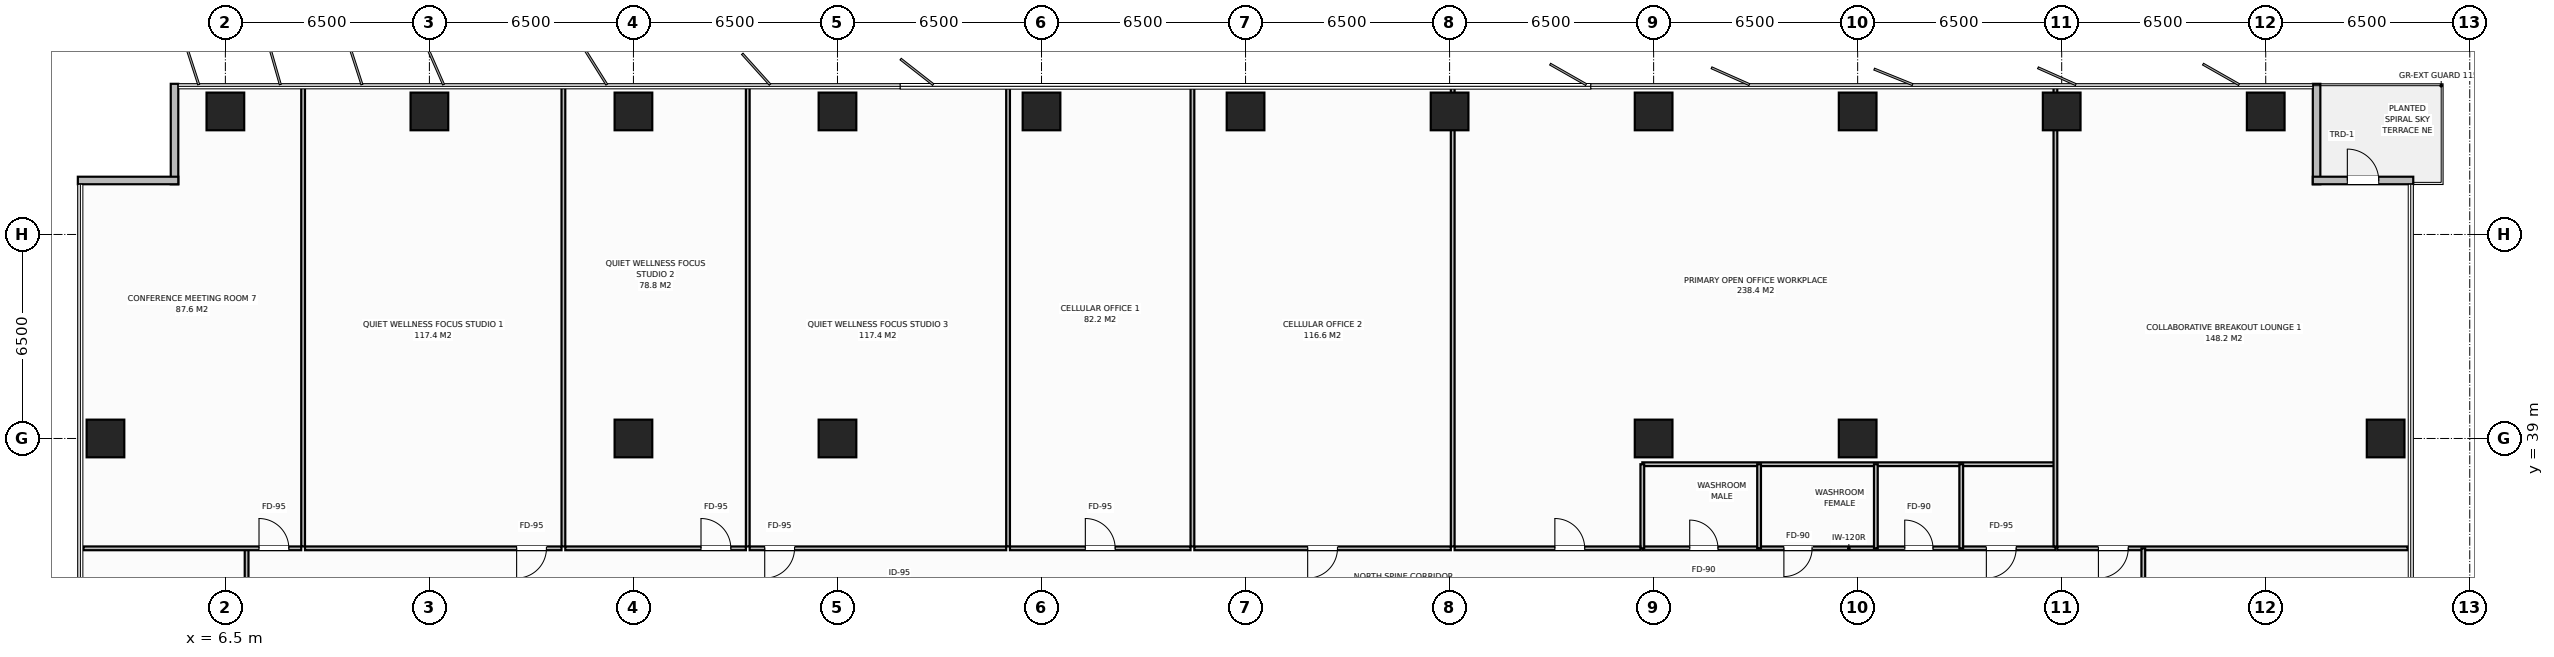
"""IFC4 building model, lengths in metres.
Left out: names, types, materials, properties, quantities, classifications, styles, units other than length and angle.
Written with IfcOpenShell. Run it as: python <this file> out.ifc"""

import sys

from ifc_helpers import new_model, si_unit, direction, frame, frame_2d, origin, origin_2d, place, context, subcontext, project, spatial, rectangle, extrude, element, fill, save


model = new_model("IFC4")
c1 = context("Model", 3, precision=1e-05, world=origin(), true_north=direction((0.0, 1.0)))
c2 = subcontext(c1, "Body", "Model", "MODEL_VIEW")
j1 = project(units=[si_unit("LENGTHUNIT", "METRE"), si_unit("PLANEANGLEUNIT", "RADIAN")], contexts=[c1])
p1 = place(None, origin())
s1 = spatial("IfcSite", under=j1, at=p1, CompositionType="ELEMENT")
p2 = place(p1, origin())
s2 = spatial("IfcBuilding", under=s1, at=p2, CompositionType="ELEMENT")
p3 = place(p2, frame((0.0, 0.0, 135.4)))
s3 = spatial("IfcBuildingStorey", under=s2, at=p3, CompositionType="ELEMENT", Elevation=135.4)
for number, where, z_axis, x_axis in (
    (1, (19.5, 39.0, 0.0), (0.0, 0.0, 1.0), (1.0, 0.0, 0.0)),
    (2, (58.5, 39.0, 0.0), (0.0, 0.0, 1.0), (1.0, 0.0, 0.0)),
    (3, (26.0, 39.0, 0.0), (0.0, 0.0, 1.0), (1.0, 0.0, 0.0)),
    (4, (52.0, 39.0, 0.0), (0.0, 0.0, 1.0), (1.0, 0.0, 0.0)),
    (5, (6.5, 49.42, 0.0), (0.0, 0.0, 1.0), (1.0, 0.0, 0.0)),
    (6, (13.0, 49.42, 0.0), (0.0, 0.0, 1.0), (1.0, 0.0, 0.0)),
    (7, (19.5, 49.42, 0.0), (0.0, 0.0, 1.0), (1.0, 0.0, 0.0)),
    (8, (26.0, 49.42, 0.0), (0.0, 0.0, 1.0), (1.0, 0.0, 0.0)),
    (9, (32.5, 49.42, 0.0), (0.0, 0.0, 1.0), (1.0, 0.0, 0.0)),
    (10, (39.0, 49.42, 0.0), (0.0, 0.0, 1.0), (1.0, 0.0, 0.0)),
    (11, (45.5, 49.42, 0.0), (0.0, 0.0, 1.0), (1.0, 0.0, 0.0)),
    (12, (52.0, 49.42, 0.0), (0.0, 0.0, 1.0), (1.0, 0.0, 0.0)),
    (13, (58.5, 49.42, 0.0), (0.0, 0.0, 1.0), (1.0, 0.0, 0.0)),
    (14, (65.0, 49.42, 0.0), (0.0, 0.0, 1.0), (1.0, 0.0, 0.0)),
    (15, (71.5, 49.42, 0.0), (0.0, 0.0, 1.0), (1.0, 0.0, 0.0)),
    (16, (2.68, 39.0, 0.0), (0.0, 0.0, 1.0), (1.0, 0.0, 0.0)),
    (17, (75.32, 39.0, 0.0), (0.0, 0.0, 1.0), (1.0, 0.0, 0.0)),
):
    element("IfcColumn", number, at=place(p3, frame(where, z_axis=z_axis, x_axis=x_axis)), inside=s3, PredefinedType="COLUMN", context=c2, shape_type="SweptSolid", body=[
        extrude(rectangle(XDim=1.2, YDim=1.2, at=origin_2d()), origin(), (0.0, 0.0, 1.0), 3.8),
    ])
for number, where, z_axis, x_axis in (
    (18, (4.88, 47.1, 0.0), (0.0, 0.0, 1.0), (0.0, 1.0, 0.0)),
    (19, (1.8, 47.22, 0.0), (0.0, 0.0, 1.0), (1.0, 0.0, 0.0)),
    (20, (73.12, 50.3, 0.0), (0.0, 0.0, 1.0), (0.0, -1.0, 0.0)),
):
    element("IfcWall", number, at=place(p3, frame(where, z_axis=z_axis, x_axis=x_axis)), inside=s3, PredefinedType="STANDARD", context=c2, shape_type="SweptSolid", body=[
        extrude(rectangle(XDim=3.2, YDim=0.24, at=frame_2d((1.6, 0.0))), origin(), (0.0, 0.0, 1.0), 3.52),
    ])
p4 = place(p3, frame((73.0, 47.22, 0.0), z_axis=(0.0, 0.0, 1.0), x_axis=(1.0, 0.0, 0.0)))
e21 = element("IfcWall", 21, at=p4, inside=s3, PredefinedType="STANDARD", context=c2, shape_type="SweptSolid", body=[
    extrude(rectangle(XDim=3.2, YDim=0.24, at=frame_2d((1.6, 0.0))), origin(), (0.0, 0.0, 1.0), 3.52),
])
p5 = place(p4, frame((1.1, 0.0, 0.0)))
e22 = element("IfcOpeningElement", 22, at=p5, cuts=e21, PredefinedType="OPENING", context=c2, shape_type="SweptSolid", body=[
    extrude(rectangle(XDim=1.0, YDim=2.2, at=frame_2d((0.5, 1.1))), frame((0.0, 0.13, 0.0), z_axis=(0.0, -1.0, 0.0), x_axis=(1.0, 0.0, 0.0)), (0.0, 0.0, 1.0), 0.26),
])
p6 = place(p3, frame((7.177, 33.4, 0.0), z_axis=(0.0, 0.0, 1.0), x_axis=(0.0, 1.0, 0.0)))
e23 = element("IfcWall", 23, at=p6, inside=s3, PredefinedType="PARTITIONING", context=c2, shape_type="SweptSolid", body=[
    extrude(rectangle(XDim=2.1, YDim=0.12, at=frame_2d((1.05, 0.0))), origin(), (0.0, 0.0, 1.0), 3.52),
])
p7 = place(p3, frame((51.64, 35.5, 0.0), z_axis=(0.0, 0.0, 1.0), x_axis=(1.0, 0.0, 0.0)))
e24 = element("IfcWall", 24, at=p7, inside=s3, PredefinedType="PARTITIONING", context=c2, shape_type="SweptSolid", body=[
    extrude(rectangle(XDim=13.16, YDim=0.12, at=frame_2d((6.58, 0.0))), origin(), (0.0, 0.0, 1.0), 3.52),
])
p8 = place(p7, frame((1.51, 0.0, 0.0)))
e25 = element("IfcOpeningElement", 25, at=p8, cuts=e24, PredefinedType="OPENING", context=c2, shape_type="SweptSolid", body=[
    extrude(rectangle(XDim=0.9, YDim=2.15, at=frame_2d((0.45, 1.075))), frame((0.0, 0.07, 0.0), z_axis=(0.0, -1.0, 0.0), x_axis=(1.0, 0.0, 0.0)), (0.0, 0.0, 1.0), 0.14),
])
p9 = place(p7, frame((4.51, 0.0, 0.0)))
e26 = element("IfcOpeningElement", 26, at=p9, cuts=e24, PredefinedType="OPENING", context=c2, shape_type="SweptSolid", body=[
    extrude(rectangle(XDim=0.9, YDim=2.15, at=frame_2d((0.45, 1.075))), frame((0.0, 0.07, 0.0), z_axis=(0.0, -1.0, 0.0), x_axis=(1.0, 0.0, 0.0)), (0.0, 0.0, 1.0), 0.14),
])
p10 = place(p7, frame((8.36, 0.0, 0.0)))
e27 = element("IfcOpeningElement", 27, at=p10, cuts=e24, PredefinedType="OPENING", context=c2, shape_type="SweptSolid", body=[
    extrude(rectangle(XDim=0.9, YDim=2.15, at=frame_2d((0.45, 1.075))), frame((0.0, 0.07, 0.0), z_axis=(0.0, -1.0, 0.0), x_axis=(1.0, 0.0, 0.0)), (0.0, 0.0, 1.0), 0.14),
])
p11 = place(p7, frame((10.96, 0.0, 0.0)))
e28 = element("IfcOpeningElement", 28, at=p11, cuts=e24, PredefinedType="OPENING", context=c2, shape_type="SweptSolid", body=[
    extrude(rectangle(XDim=0.95, YDim=2.15, at=frame_2d((0.475, 1.075))), frame((0.0, 0.07, 0.0), z_axis=(0.0, -1.0, 0.0), x_axis=(1.0, 0.0, 0.0)), (0.0, 0.0, 1.0), 0.14),
])
p12 = place(p3, frame((51.64, 38.18, 0.0), z_axis=(0.0, 0.0, 1.0), x_axis=(1.0, 0.0, 0.0)))
e29 = element("IfcWall", 29, at=p12, inside=s3, PredefinedType="PARTITIONING", context=c2, shape_type="SweptSolid", body=[
    extrude(rectangle(XDim=13.16, YDim=0.12, at=frame_2d((6.58, 0.0))), origin(), (0.0, 0.0, 1.0), 3.52),
])
for number, where, z_axis, x_axis in (
    (30, (51.64, 35.5, 0.0), (0.0, 0.0, 1.0), (0.0, 1.0, 0.0)),
    (31, (55.36, 35.5, 0.0), (0.0, 0.0, 1.0), (0.0, 1.0, 0.0)),
    (32, (59.08, 35.5, 0.0), (0.0, 0.0, 1.0), (0.0, 1.0, 0.0)),
    (33, (61.8, 35.5, 0.0), (0.0, 0.0, 1.0), (0.0, 1.0, 0.0)),
):
    element("IfcWall", number, at=place(p3, frame(where, z_axis=z_axis, x_axis=x_axis)), inside=s3, PredefinedType="PARTITIONING", context=c2, shape_type="SweptSolid", body=[
        extrude(rectangle(XDim=2.68, YDim=0.12, at=frame_2d((1.34, 0.0))), origin(), (0.0, 0.0, 1.0), 3.52),
    ])
p13 = place(p3, frame((8.977, 35.56, 0.0), z_axis=(0.0, 0.0, 1.0), x_axis=(0.0, 1.0, 0.0)))
e34 = element("IfcWall", 34, at=p13, inside=s3, PredefinedType="PARTITIONING", context=c2, shape_type="SweptSolid", body=[
    extrude(rectangle(XDim=14.72, YDim=0.12, at=frame_2d((7.36, 0.0))), origin(), (0.0, 0.0, 1.0), 3.52),
])
p14 = place(p3, frame((1.98, 35.5, 0.0), z_axis=(0.0, 0.0, 1.0), x_axis=(1.0, 0.0, 0.0)))
e35 = element("IfcWall", 35, at=p14, inside=s3, PredefinedType="PARTITIONING", context=c2, shape_type="SweptSolid", body=[
    extrude(rectangle(XDim=6.937, YDim=0.12, at=frame_2d((3.468, 0.0))), origin(), (0.0, 0.0, 1.0), 3.52),
])
p15 = place(p14, frame((5.592, 0.0, 0.0)))
e36 = element("IfcOpeningElement", 36, at=p15, cuts=e35, PredefinedType="OPENING", context=c2, shape_type="SweptSolid", body=[
    extrude(rectangle(XDim=0.95, YDim=2.15, at=frame_2d((0.475, 1.075))), frame((0.0, 0.07, 0.0), z_axis=(0.0, -1.0, 0.0), x_axis=(1.0, 0.0, 0.0)), (0.0, 0.0, 1.0), 0.14),
])
p16 = place(p3, frame((17.269, 35.56, 0.0), z_axis=(0.0, 0.0, 1.0), x_axis=(0.0, 1.0, 0.0)))
e37 = element("IfcWall", 37, at=p16, inside=s3, PredefinedType="PARTITIONING", context=c2, shape_type="SweptSolid", body=[
    extrude(rectangle(XDim=14.72, YDim=0.12, at=frame_2d((7.36, 0.0))), origin(), (0.0, 0.0, 1.0), 3.52),
])
p17 = place(p3, frame((9.037, 35.5, 0.0), z_axis=(0.0, 0.0, 1.0), x_axis=(1.0, 0.0, 0.0)))
e38 = element("IfcWall", 38, at=p17, inside=s3, PredefinedType="PARTITIONING", context=c2, shape_type="SweptSolid", body=[
    extrude(rectangle(XDim=8.172, YDim=0.12, at=frame_2d((4.086, 0.0))), origin(), (0.0, 0.0, 1.0), 3.52),
])
p18 = place(p17, frame((6.742, 0.0, 0.0)))
e39 = element("IfcOpeningElement", 39, at=p18, cuts=e38, PredefinedType="OPENING", context=c2, shape_type="SweptSolid", body=[
    extrude(rectangle(XDim=0.95, YDim=2.15, at=frame_2d((0.475, 1.075))), frame((0.0, 0.07, 0.0), z_axis=(0.0, -1.0, 0.0), x_axis=(1.0, 0.0, 0.0)), (0.0, 0.0, 1.0), 0.14),
])
p19 = place(p3, frame((23.142, 35.56, 0.0), z_axis=(0.0, 0.0, 1.0), x_axis=(0.0, 1.0, 0.0)))
e40 = element("IfcWall", 40, at=p19, inside=s3, PredefinedType="PARTITIONING", context=c2, shape_type="SweptSolid", body=[
    extrude(rectangle(XDim=14.72, YDim=0.12, at=frame_2d((7.36, 0.0))), origin(), (0.0, 0.0, 1.0), 3.52),
])
p20 = place(p3, frame((17.329, 35.5, 0.0), z_axis=(0.0, 0.0, 1.0), x_axis=(1.0, 0.0, 0.0)))
e41 = element("IfcWall", 41, at=p20, inside=s3, PredefinedType="PARTITIONING", context=c2, shape_type="SweptSolid", body=[
    extrude(rectangle(XDim=5.754, YDim=0.12, at=frame_2d((2.877, 0.0))), origin(), (0.0, 0.0, 1.0), 3.52),
])
p21 = place(p20, frame((4.323, 0.0, 0.0)))
e42 = element("IfcOpeningElement", 42, at=p21, cuts=e41, PredefinedType="OPENING", context=c2, shape_type="SweptSolid", body=[
    extrude(rectangle(XDim=0.95, YDim=2.15, at=frame_2d((0.475, 1.075))), frame((0.0, 0.07, 0.0), z_axis=(0.0, -1.0, 0.0), x_axis=(1.0, 0.0, 0.0)), (0.0, 0.0, 1.0), 0.14),
])
p22 = place(p3, frame((31.434, 35.56, 0.0), z_axis=(0.0, 0.0, 1.0), x_axis=(0.0, 1.0, 0.0)))
e43 = element("IfcWall", 43, at=p22, inside=s3, PredefinedType="PARTITIONING", context=c2, shape_type="SweptSolid", body=[
    extrude(rectangle(XDim=14.72, YDim=0.12, at=frame_2d((7.36, 0.0))), origin(), (0.0, 0.0, 1.0), 3.52),
])
p23 = place(p3, frame((23.202, 35.5, 0.0), z_axis=(0.0, 0.0, 1.0), x_axis=(1.0, 0.0, 0.0)))
e44 = element("IfcWall", 44, at=p23, inside=s3, PredefinedType="PARTITIONING", context=c2, shape_type="SweptSolid", body=[
    extrude(rectangle(XDim=8.172, YDim=0.12, at=frame_2d((4.086, 0.0))), origin(), (0.0, 0.0, 1.0), 3.52),
])
p24 = place(p23, frame((0.48, 0.0, 0.0)))
e45 = element("IfcOpeningElement", 45, at=p24, cuts=e44, PredefinedType="OPENING", context=c2, shape_type="SweptSolid", body=[
    extrude(rectangle(XDim=0.95, YDim=2.15, at=frame_2d((0.475, 1.075))), frame((0.0, 0.07, 0.0), z_axis=(0.0, -1.0, 0.0), x_axis=(1.0, 0.0, 0.0)), (0.0, 0.0, 1.0), 0.14),
])
p25 = place(p3, frame((37.308, 35.56, 0.0), z_axis=(0.0, 0.0, 1.0), x_axis=(0.0, 1.0, 0.0)))
e46 = element("IfcWall", 46, at=p25, inside=s3, PredefinedType="PARTITIONING", context=c2, shape_type="SweptSolid", body=[
    extrude(rectangle(XDim=14.72, YDim=0.12, at=frame_2d((7.36, 0.0))), origin(), (0.0, 0.0, 1.0), 3.52),
])
p26 = place(p3, frame((31.494, 35.5, 0.0), z_axis=(0.0, 0.0, 1.0), x_axis=(1.0, 0.0, 0.0)))
e47 = element("IfcWall", 47, at=p26, inside=s3, PredefinedType="PARTITIONING", context=c2, shape_type="SweptSolid", body=[
    extrude(rectangle(XDim=5.753, YDim=0.12, at=frame_2d((2.877, 0.0))), origin(), (0.0, 0.0, 1.0), 3.52),
])
p27 = place(p26, frame((2.402, 0.0, 0.0)))
e48 = element("IfcOpeningElement", 48, at=p27, cuts=e47, PredefinedType="OPENING", context=c2, shape_type="SweptSolid", body=[
    extrude(rectangle(XDim=0.95, YDim=2.15, at=frame_2d((0.475, 1.075))), frame((0.0, 0.07, 0.0), z_axis=(0.0, -1.0, 0.0), x_axis=(1.0, 0.0, 0.0)), (0.0, 0.0, 1.0), 0.14),
])
p28 = place(p3, frame((45.6, 35.56, 0.0), z_axis=(0.0, 0.0, 1.0), x_axis=(0.0, 1.0, 0.0)))
e49 = element("IfcWall", 49, at=p28, inside=s3, PredefinedType="PARTITIONING", context=c2, shape_type="SweptSolid", body=[
    extrude(rectangle(XDim=14.72, YDim=0.12, at=frame_2d((7.36, 0.0))), origin(), (0.0, 0.0, 1.0), 2.72),
])
p29 = place(p3, frame((37.368, 35.5, 0.0), z_axis=(0.0, 0.0, 1.0), x_axis=(1.0, 0.0, 0.0)))
e50 = element("IfcWall", 50, at=p29, inside=s3, PredefinedType="PARTITIONING", context=c2, shape_type="SweptSolid", body=[
    extrude(rectangle(XDim=8.172, YDim=0.12, at=frame_2d((4.086, 0.0))), origin(), (0.0, 0.0, 1.0), 3.52),
])
p30 = place(p29, frame((3.611, 0.0, 0.0)))
e51 = element("IfcOpeningElement", 51, at=p30, cuts=e50, PredefinedType="OPENING", context=c2, shape_type="SweptSolid", body=[
    extrude(rectangle(XDim=0.95, YDim=2.15, at=frame_2d((0.475, 1.075))), frame((0.0, 0.07, 0.0), z_axis=(0.0, -1.0, 0.0), x_axis=(1.0, 0.0, 0.0)), (0.0, 0.0, 1.0), 0.14),
])
p31 = place(p3, frame((64.8, 35.56, 0.0), z_axis=(0.0, 0.0, 1.0), x_axis=(0.0, 1.0, 0.0)))
e52 = element("IfcWall", 52, at=p31, inside=s3, PredefinedType="PARTITIONING", context=c2, shape_type="SweptSolid", body=[
    extrude(rectangle(XDim=14.72, YDim=0.12, at=frame_2d((7.36, 0.0))), origin(), (0.0, 0.0, 1.0), 2.72),
])
p32 = place(p3, frame((45.66, 35.5, 0.0), z_axis=(0.0, 0.0, 1.0), x_axis=(1.0, 0.0, 0.0)))
e53 = element("IfcWall", 53, at=p32, inside=s3, PredefinedType="PARTITIONING", context=c2, shape_type="SweptSolid", body=[
    extrude(rectangle(XDim=5.92, YDim=0.12, at=frame_2d((2.96, 0.0))), origin(), (0.0, 0.0, 1.0), 3.52),
])
p33 = place(p32, frame((3.194, 0.0, 0.0)))
e54 = element("IfcOpeningElement", 54, at=p33, cuts=e53, PredefinedType="OPENING", context=c2, shape_type="SweptSolid", body=[
    extrude(rectangle(XDim=0.95, YDim=2.15, at=frame_2d((0.475, 1.075))), frame((0.0, 0.07, 0.0), z_axis=(0.0, -1.0, 0.0), x_axis=(1.0, 0.0, 0.0)), (0.0, 0.0, 1.0), 0.14),
])
p34 = place(p3, frame((64.86, 35.5, 0.0), z_axis=(0.0, 0.0, 1.0), x_axis=(1.0, 0.0, 0.0)))
e55 = element("IfcWall", 55, at=p34, inside=s3, PredefinedType="PARTITIONING", context=c2, shape_type="SweptSolid", body=[
    extrude(rectangle(XDim=11.16, YDim=0.12, at=frame_2d((5.58, 0.0))), origin(), (0.0, 0.0, 1.0), 3.52),
])
p35 = place(p34, frame((1.31, 0.0, 0.0)))
e56 = element("IfcOpeningElement", 56, at=p35, cuts=e55, PredefinedType="OPENING", context=c2, shape_type="SweptSolid", body=[
    extrude(rectangle(XDim=0.95, YDim=2.15, at=frame_2d((0.475, 1.075))), frame((0.0, 0.07, 0.0), z_axis=(0.0, -1.0, 0.0), x_axis=(1.0, 0.0, 0.0)), (0.0, 0.0, 1.0), 0.14),
])
p36 = place(p3, frame((67.6, 27.05, 0.0), z_axis=(0.0, 0.0, 1.0), x_axis=(0.0, 1.0, 0.0)))
e57 = element("IfcWall", 57, at=p36, inside=s3, PredefinedType="PARTITIONING", context=c2, shape_type="SweptSolid", body=[
    extrude(rectangle(XDim=8.45, YDim=0.12, at=frame_2d((4.225, 0.0))), origin(), (0.0, 0.0, 1.0), 3.52),
])
p37 = place(p36, frame((2.7, 0.0, 0.0)))
e58 = element("IfcOpeningElement", 58, at=p37, cuts=e57, PredefinedType="OPENING", context=c2, shape_type="SweptSolid", body=[
    extrude(rectangle(XDim=0.95, YDim=2.15, at=frame_2d((0.475, 1.075))), frame((0.0, 0.07, 0.0), z_axis=(0.0, -1.0, 0.0), x_axis=(1.0, 0.0, 0.0)), (0.0, 0.0, 1.0), 0.14),
])
p38 = place(p5, origin())
e59 = element("IfcDoor", 59, at=p38, inside=s3, OperationType="SINGLE_SWING_LEFT", PredefinedType="DOOR", context=c2, shape_type="SweptSolid", body=[
    extrude(rectangle(XDim=1.0, YDim=2.2, at=frame_2d((0.5, 1.1))), frame((0.0, 0.025, 0.0), z_axis=(0.0, -1.0, 0.0), x_axis=(1.0, 0.0, 0.0)), (0.0, 0.0, 1.0), 0.05),
])
fill(e22, e59)
p39 = place(p8, origin())
e60 = element("IfcDoor", 60, at=p39, inside=s3, OperationType="SINGLE_SWING_LEFT", PredefinedType="DOOR", context=c2, shape_type="SweptSolid", body=[
    extrude(rectangle(XDim=0.9, YDim=2.15, at=frame_2d((0.45, 1.075))), frame((0.0, 0.025, 0.0), z_axis=(0.0, -1.0, 0.0), x_axis=(1.0, 0.0, 0.0)), (0.0, 0.0, 1.0), 0.05),
])
fill(e25, e60)
p40 = place(p9, origin())
e61 = element("IfcDoor", 61, at=p40, inside=s3, OperationType="SINGLE_SWING_RIGHT", PredefinedType="DOOR", context=c2, shape_type="SweptSolid", body=[
    extrude(rectangle(XDim=0.9, YDim=2.15, at=frame_2d((0.45, 1.075))), frame((0.0, 0.025, 0.0), z_axis=(0.0, -1.0, 0.0), x_axis=(1.0, 0.0, 0.0)), (0.0, 0.0, 1.0), 0.05),
])
fill(e26, e61)
p41 = place(p10, origin())
e62 = element("IfcDoor", 62, at=p41, inside=s3, OperationType="SINGLE_SWING_LEFT", PredefinedType="DOOR", context=c2, shape_type="SweptSolid", body=[
    extrude(rectangle(XDim=0.9, YDim=2.15, at=frame_2d((0.45, 1.075))), frame((0.0, 0.025, 0.0), z_axis=(0.0, -1.0, 0.0), x_axis=(1.0, 0.0, 0.0)), (0.0, 0.0, 1.0), 0.05),
])
fill(e27, e62)
p42 = place(p11, origin())
e63 = element("IfcDoor", 63, at=p42, inside=s3, OperationType="SINGLE_SWING_RIGHT", PredefinedType="DOOR", context=c2, shape_type="SweptSolid", body=[
    extrude(rectangle(XDim=0.95, YDim=2.15, at=frame_2d((0.475, 1.075))), frame((0.0, 0.025, 0.0), z_axis=(0.0, -1.0, 0.0), x_axis=(1.0, 0.0, 0.0)), (0.0, 0.0, 1.0), 0.05),
])
fill(e28, e63)
p43 = place(p15, origin())
e64 = element("IfcDoor", 64, at=p43, inside=s3, OperationType="SINGLE_SWING_LEFT", PredefinedType="DOOR", context=c2, shape_type="SweptSolid", body=[
    extrude(rectangle(XDim=0.95, YDim=2.15, at=frame_2d((0.475, 1.075))), frame((0.0, 0.025, 0.0), z_axis=(0.0, -1.0, 0.0), x_axis=(1.0, 0.0, 0.0)), (0.0, 0.0, 1.0), 0.05),
])
fill(e36, e64)
p44 = place(p18, origin())
e65 = element("IfcDoor", 65, at=p44, inside=s3, OperationType="SINGLE_SWING_RIGHT", PredefinedType="DOOR", context=c2, shape_type="SweptSolid", body=[
    extrude(rectangle(XDim=0.95, YDim=2.15, at=frame_2d((0.475, 1.075))), frame((0.0, 0.025, 0.0), z_axis=(0.0, -1.0, 0.0), x_axis=(1.0, 0.0, 0.0)), (0.0, 0.0, 1.0), 0.05),
])
fill(e39, e65)
p45 = place(p21, origin())
e66 = element("IfcDoor", 66, at=p45, inside=s3, OperationType="SINGLE_SWING_LEFT", PredefinedType="DOOR", context=c2, shape_type="SweptSolid", body=[
    extrude(rectangle(XDim=0.95, YDim=2.15, at=frame_2d((0.475, 1.075))), frame((0.0, 0.025, 0.0), z_axis=(0.0, -1.0, 0.0), x_axis=(1.0, 0.0, 0.0)), (0.0, 0.0, 1.0), 0.05),
])
fill(e42, e66)
p46 = place(p24, origin())
e67 = element("IfcDoor", 67, at=p46, inside=s3, OperationType="SINGLE_SWING_RIGHT", PredefinedType="DOOR", context=c2, shape_type="SweptSolid", body=[
    extrude(rectangle(XDim=0.95, YDim=2.15, at=frame_2d((0.475, 1.075))), frame((0.0, 0.025, 0.0), z_axis=(0.0, -1.0, 0.0), x_axis=(1.0, 0.0, 0.0)), (0.0, 0.0, 1.0), 0.05),
])
fill(e45, e67)
p47 = place(p27, origin())
e68 = element("IfcDoor", 68, at=p47, inside=s3, OperationType="SINGLE_SWING_LEFT", PredefinedType="DOOR", context=c2, shape_type="SweptSolid", body=[
    extrude(rectangle(XDim=0.95, YDim=2.15, at=frame_2d((0.475, 1.075))), frame((0.0, 0.025, 0.0), z_axis=(0.0, -1.0, 0.0), x_axis=(1.0, 0.0, 0.0)), (0.0, 0.0, 1.0), 0.05),
])
fill(e48, e68)
p48 = place(p30, origin())
e69 = element("IfcDoor", 69, at=p48, inside=s3, OperationType="SINGLE_SWING_RIGHT", PredefinedType="DOOR", context=c2, shape_type="SweptSolid", body=[
    extrude(rectangle(XDim=0.95, YDim=2.15, at=frame_2d((0.475, 1.075))), frame((0.0, 0.025, 0.0), z_axis=(0.0, -1.0, 0.0), x_axis=(1.0, 0.0, 0.0)), (0.0, 0.0, 1.0), 0.05),
])
fill(e51, e69)
p49 = place(p33, origin())
e70 = element("IfcDoor", 70, at=p49, inside=s3, OperationType="SINGLE_SWING_LEFT", PredefinedType="DOOR", context=c2, shape_type="SweptSolid", body=[
    extrude(rectangle(XDim=0.95, YDim=2.15, at=frame_2d((0.475, 1.075))), frame((0.0, 0.025, 0.0), z_axis=(0.0, -1.0, 0.0), x_axis=(1.0, 0.0, 0.0)), (0.0, 0.0, 1.0), 0.05),
])
fill(e54, e70)
p50 = place(p35, origin())
e71 = element("IfcDoor", 71, at=p50, inside=s3, OperationType="SINGLE_SWING_RIGHT", PredefinedType="DOOR", context=c2, shape_type="SweptSolid", body=[
    extrude(rectangle(XDim=0.95, YDim=2.15, at=frame_2d((0.475, 1.075))), frame((0.0, 0.025, 0.0), z_axis=(0.0, -1.0, 0.0), x_axis=(1.0, 0.0, 0.0)), (0.0, 0.0, 1.0), 0.05),
])
fill(e56, e71)
save(model, sys.argv[1])
